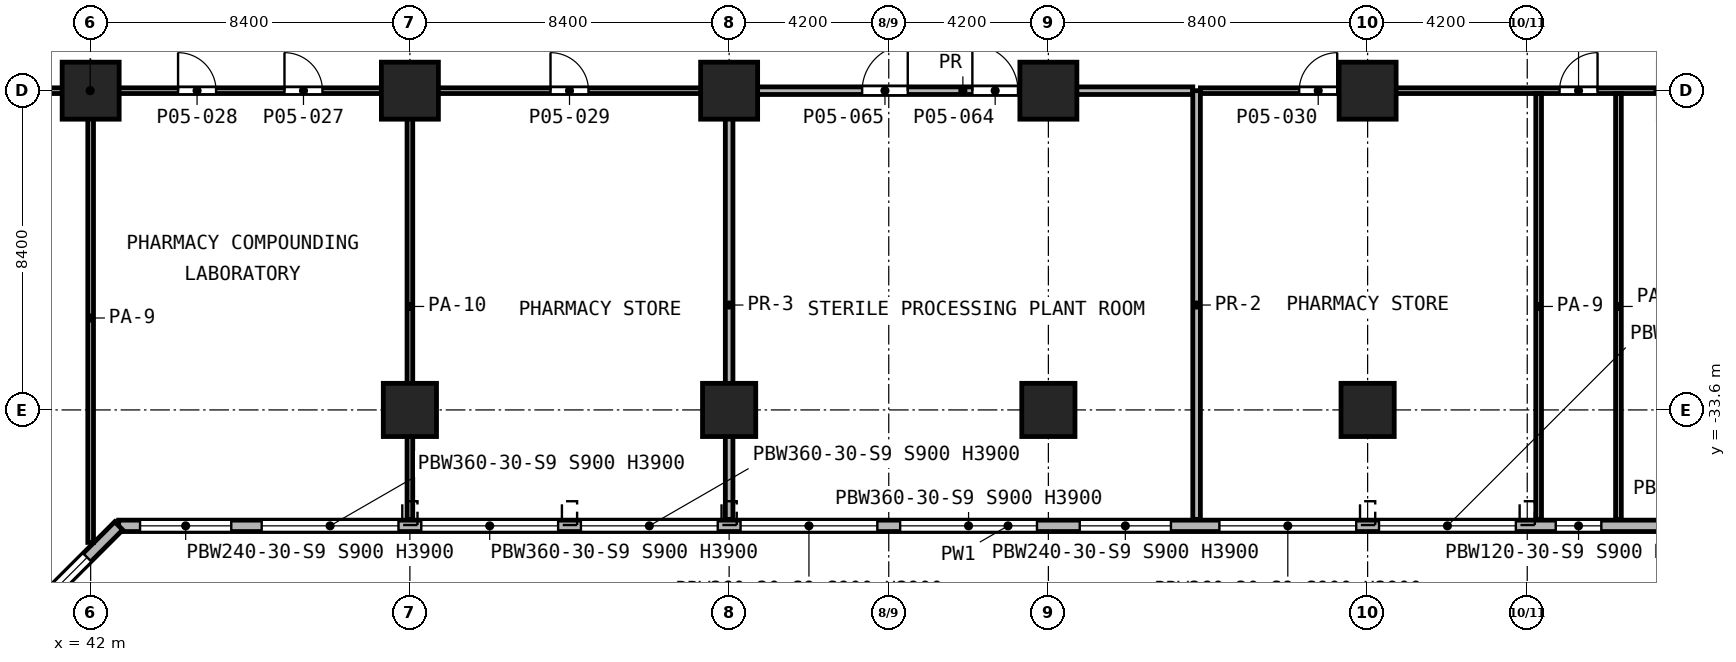
"""IFC4 building model, lengths in metres.
Left out: names, types, materials, properties, quantities, classifications, styles, units other than length and angle.
Written with IfcOpenShell. Run it as: python <this file> out.ifc"""

import sys

from ifc_helpers import new_model, si_unit, direction, frame, frame_2d, origin, origin_2d, place, context, subcontext, project, spatial, rectangle, extrude, element, fill, save


model = new_model("IFC4")
c1 = context("Model", 3, precision=1e-05, world=origin(), true_north=direction((0.0, 1.0)))
c2 = subcontext(c1, "Body", "Model", "MODEL_VIEW")
j1 = project(units=[si_unit("LENGTHUNIT", "METRE"), si_unit("PLANEANGLEUNIT", "RADIAN")], contexts=[c1])
p1 = place(None, origin())
s1 = spatial("IfcSite", under=j1, at=p1, CompositionType="ELEMENT")
p2 = place(p1, origin())
s2 = spatial("IfcBuilding", under=s1, at=p2, CompositionType="ELEMENT")
p3 = place(p2, frame((0.0, 0.0, 23.8)))
s3 = spatial("IfcBuildingStorey", under=s2, at=p3, CompositionType="ELEMENT", Elevation=23.8)
for number, where, z_axis, x_axis in (
    (1, (42.0, -25.2, 0.0), (0.0, 0.0, 1.0), (1.0, 0.0, 0.0)),
    (2, (50.4, -25.2, 0.0), (0.0, 0.0, 1.0), (1.0, 0.0, 0.0)),
    (3, (58.8, -25.2, 0.0), (0.0, 0.0, 1.0), (1.0, 0.0, 0.0)),
    (4, (67.2, -25.2, 0.0), (0.0, 0.0, 1.0), (1.0, 0.0, 0.0)),
    (5, (75.6, -25.2, 0.0), (0.0, 0.0, 1.0), (1.0, 0.0, 0.0)),
):
    element("IfcColumn", number, at=place(p3, frame(where, z_axis=z_axis, x_axis=x_axis)), inside=s3, PredefinedType="COLUMN", context=c2, shape_type="SweptSolid", body=[
        extrude(rectangle(XDim=1.5, YDim=1.5, at=origin_2d()), origin(), (0.0, 0.0, 1.0), 5.2),
    ])
for number, where, z_axis, x_axis in (
    (6, (50.4, -33.6, 0.0), (0.0, 0.0, 1.0), (1.0, 0.0, 0.0)),
    (7, (58.8, -33.6, 0.0), (0.0, 0.0, 1.0), (1.0, 0.0, 0.0)),
    (8, (67.2, -33.6, 0.0), (0.0, 0.0, 1.0), (1.0, 0.0, 0.0)),
    (9, (75.6, -33.6, 0.0), (0.0, 0.0, 1.0), (1.0, 0.0, 0.0)),
):
    element("IfcColumn", number, at=place(p3, frame(where, z_axis=z_axis, x_axis=x_axis)), inside=s3, PredefinedType="COLUMN", context=c2, shape_type="SweptSolid", body=[
        extrude(rectangle(XDim=1.4, YDim=1.4, at=origin_2d()), origin(), (0.0, 0.0, 1.0), 5.2),
    ])
p4 = place(p3, frame((36.65, -42.738, 0.0), z_axis=(0.0, 0.0, 1.0), x_axis=(0.707106781187, 0.707106781187, 0.0)))
e10 = element("IfcWall", 10, at=p4, inside=s3, PredefinedType="SOLIDWALL", context=c2, shape_type="SweptSolid", body=[
    extrude(rectangle(XDim=8.61, YDim=0.3, at=frame_2d((4.305, 0.0))), origin(), (0.0, 0.0, 1.0), 4.85),
])
p5 = place(p4, frame((1.09, 0.0, 0.9)))
e11 = element("IfcOpeningElement", 11, at=p5, cuts=e10, PredefinedType="OPENING", context=c2, shape_type="SweptSolid", body=[
    extrude(rectangle(XDim=2.4, YDim=3.0, at=frame_2d((1.2, 1.5))), frame((0.0, 0.16, 0.0), z_axis=(0.0, -1.0, 0.0), x_axis=(1.0, 0.0, 0.0)), (0.0, 0.0, 1.0), 0.32),
])
p6 = place(p4, frame((5.035, 0.0, 0.9)))
e12 = element("IfcOpeningElement", 12, at=p6, cuts=e10, PredefinedType="OPENING", context=c2, shape_type="SweptSolid", body=[
    extrude(rectangle(XDim=2.4, YDim=3.0, at=frame_2d((1.2, 1.5))), frame((0.0, 0.16, 0.0), z_axis=(0.0, -1.0, 0.0), x_axis=(1.0, 0.0, 0.0)), (0.0, 0.0, 1.0), 0.32),
])
p7 = place(p3, frame((42.738, -36.65, 0.0), z_axis=(0.0, 0.0, 1.0), x_axis=(1.0, 0.0, 0.0)))
e13 = element("IfcWall", 13, at=p7, inside=s3, PredefinedType="SOLIDWALL", context=c2, shape_type="SweptSolid", body=[
    extrude(rectangle(XDim=46.8, YDim=0.3, at=frame_2d((23.4, 0.0))), origin(), (0.0, 0.0, 1.0), 4.85),
])
p8 = place(p7, frame((0.562, 0.0, 0.9)))
e14 = element("IfcOpeningElement", 14, at=p8, cuts=e13, PredefinedType="OPENING", context=c2, shape_type="SweptSolid", body=[
    extrude(rectangle(XDim=2.4, YDim=3.0, at=frame_2d((1.2, 1.5))), frame((0.0, 0.16, 0.0), z_axis=(0.0, -1.0, 0.0), x_axis=(1.0, 0.0, 0.0)), (0.0, 0.0, 1.0), 0.32),
])
p9 = place(p7, frame((3.762, 0.0, 0.9)))
e15 = element("IfcOpeningElement", 15, at=p9, cuts=e13, PredefinedType="OPENING", context=c2, shape_type="SweptSolid", body=[
    extrude(rectangle(XDim=3.6, YDim=3.0, at=frame_2d((1.8, 1.5))), frame((0.0, 0.16, 0.0), z_axis=(0.0, -1.0, 0.0), x_axis=(1.0, 0.0, 0.0)), (0.0, 0.0, 1.0), 0.32),
])
p10 = place(p7, frame((7.962, 0.0, 0.9)))
e16 = element("IfcOpeningElement", 16, at=p10, cuts=e13, PredefinedType="OPENING", context=c2, shape_type="SweptSolid", body=[
    extrude(rectangle(XDim=3.6, YDim=3.0, at=frame_2d((1.8, 1.5))), frame((0.0, 0.16, 0.0), z_axis=(0.0, -1.0, 0.0), x_axis=(1.0, 0.0, 0.0)), (0.0, 0.0, 1.0), 0.32),
])
p11 = place(p7, frame((12.162, 0.0, 0.9)))
e17 = element("IfcOpeningElement", 17, at=p11, cuts=e13, PredefinedType="OPENING", context=c2, shape_type="SweptSolid", body=[
    extrude(rectangle(XDim=3.6, YDim=3.0, at=frame_2d((1.8, 1.5))), frame((0.0, 0.16, 0.0), z_axis=(0.0, -1.0, 0.0), x_axis=(1.0, 0.0, 0.0)), (0.0, 0.0, 1.0), 0.32),
])
p12 = place(p7, frame((16.362, 0.0, 0.9)))
e18 = element("IfcOpeningElement", 18, at=p12, cuts=e13, PredefinedType="OPENING", context=c2, shape_type="SweptSolid", body=[
    extrude(rectangle(XDim=3.6, YDim=3.0, at=frame_2d((1.8, 1.5))), frame((0.0, 0.16, 0.0), z_axis=(0.0, -1.0, 0.0), x_axis=(1.0, 0.0, 0.0)), (0.0, 0.0, 1.0), 0.32),
])
p13 = place(p7, frame((20.562, 0.0, 0.9)))
e19 = element("IfcOpeningElement", 19, at=p13, cuts=e13, PredefinedType="OPENING", context=c2, shape_type="SweptSolid", body=[
    extrude(rectangle(XDim=3.6, YDim=3.0, at=frame_2d((1.8, 1.5))), frame((0.0, 0.16, 0.0), z_axis=(0.0, -1.0, 0.0), x_axis=(1.0, 0.0, 0.0)), (0.0, 0.0, 1.0), 0.32),
])
p14 = place(p7, frame((25.287, 0.0, 0.9)))
e20 = element("IfcOpeningElement", 20, at=p14, cuts=e13, PredefinedType="OPENING", context=c2, shape_type="SweptSolid", body=[
    extrude(rectangle(XDim=2.4, YDim=3.0, at=frame_2d((1.2, 1.5))), frame((0.0, 0.16, 0.0), z_axis=(0.0, -1.0, 0.0), x_axis=(1.0, 0.0, 0.0)), (0.0, 0.0, 1.0), 0.32),
])
p15 = place(p7, frame((28.962, 0.0, 0.9)))
e21 = element("IfcOpeningElement", 21, at=p15, cuts=e13, PredefinedType="OPENING", context=c2, shape_type="SweptSolid", body=[
    extrude(rectangle(XDim=3.6, YDim=3.0, at=frame_2d((1.8, 1.5))), frame((0.0, 0.16, 0.0), z_axis=(0.0, -1.0, 0.0), x_axis=(1.0, 0.0, 0.0)), (0.0, 0.0, 1.0), 0.32),
])
p16 = place(p7, frame((33.162, 0.0, 0.9)))
e22 = element("IfcOpeningElement", 22, at=p16, cuts=e13, PredefinedType="OPENING", context=c2, shape_type="SweptSolid", body=[
    extrude(rectangle(XDim=3.6, YDim=3.0, at=frame_2d((1.8, 1.5))), frame((0.0, 0.16, 0.0), z_axis=(0.0, -1.0, 0.0), x_axis=(1.0, 0.0, 0.0)), (0.0, 0.0, 1.0), 0.32),
])
p17 = place(p7, frame((37.812, 0.0, 0.9)))
e23 = element("IfcOpeningElement", 23, at=p17, cuts=e13, PredefinedType="OPENING", context=c2, shape_type="SweptSolid", body=[
    extrude(rectangle(XDim=1.2, YDim=3.0, at=frame_2d((0.6, 1.5))), frame((0.0, 0.16, 0.0), z_axis=(0.0, -1.0, 0.0), x_axis=(1.0, 0.0, 0.0)), (0.0, 0.0, 1.0), 0.32),
])
p18 = place(p7, frame((41.562, 0.0, 0.9)))
e24 = element("IfcOpeningElement", 24, at=p18, cuts=e13, PredefinedType="OPENING", context=c2, shape_type="SweptSolid", body=[
    extrude(rectangle(XDim=3.6, YDim=3.0, at=frame_2d((1.8, 1.5))), frame((0.0, 0.16, 0.0), z_axis=(0.0, -1.0, 0.0), x_axis=(1.0, 0.0, 0.0)), (0.0, 0.0, 1.0), 0.32),
])
p19 = place(p3, frame((25.275, -25.2, 0.0), z_axis=(0.0, 0.0, 1.0), x_axis=(1.0, 0.0, 0.0)))
e25 = element("IfcWall", 25, at=p19, inside=s3, PredefinedType="PARTITIONING", context=c2, shape_type="SweptSolid", body=[
    extrude(rectangle(XDim=33.425, YDim=0.15, at=frame_2d((16.712, 0.0))), origin(), (0.0, 0.0, 1.0), 4.85),
])
p20 = place(p19, frame((13.425, 0.0, 0.0)))
e26 = element("IfcOpeningElement", 26, at=p20, cuts=e25, PredefinedType="OPENING", context=c2, shape_type="SweptSolid", body=[
    extrude(rectangle(XDim=1.0, YDim=2.1, at=frame_2d((0.5, 1.05))), frame((0.0, 0.085, 0.0), z_axis=(0.0, -1.0, 0.0), x_axis=(1.0, 0.0, 0.0)), (0.0, 0.0, 1.0), 0.17),
])
p21 = place(p19, frame((10.625, 0.0, 0.0)))
e27 = element("IfcOpeningElement", 27, at=p21, cuts=e25, PredefinedType="OPENING", context=c2, shape_type="SweptSolid", body=[
    extrude(rectangle(XDim=1.0, YDim=2.1, at=frame_2d((0.5, 1.05))), frame((0.0, 0.085, 0.0), z_axis=(0.0, -1.0, 0.0), x_axis=(1.0, 0.0, 0.0)), (0.0, 0.0, 1.0), 0.17),
])
p22 = place(p19, frame((21.825, 0.0, 0.0)))
e28 = element("IfcOpeningElement", 28, at=p22, cuts=e25, PredefinedType="OPENING", context=c2, shape_type="SweptSolid", body=[
    extrude(rectangle(XDim=1.0, YDim=2.1, at=frame_2d((0.5, 1.05))), frame((0.0, 0.085, 0.0), z_axis=(0.0, -1.0, 0.0), x_axis=(1.0, 0.0, 0.0)), (0.0, 0.0, 1.0), 0.17),
])
p23 = place(p19, frame((19.025, 0.0, 0.0)))
e29 = element("IfcOpeningElement", 29, at=p23, cuts=e25, PredefinedType="OPENING", context=c2, shape_type="SweptSolid", body=[
    extrude(rectangle(XDim=1.0, YDim=2.1, at=frame_2d((0.5, 1.05))), frame((0.0, 0.085, 0.0), z_axis=(0.0, -1.0, 0.0), x_axis=(1.0, 0.0, 0.0)), (0.0, 0.0, 1.0), 0.17),
])
p24 = place(p19, frame((28.825, 0.0, 0.0)))
e30 = element("IfcOpeningElement", 30, at=p24, cuts=e25, PredefinedType="OPENING", context=c2, shape_type="SweptSolid", body=[
    extrude(rectangle(XDim=1.0, YDim=2.1, at=frame_2d((0.5, 1.05))), frame((0.0, 0.085, 0.0), z_axis=(0.0, -1.0, 0.0), x_axis=(1.0, 0.0, 0.0)), (0.0, 0.0, 1.0), 0.17),
])
p25 = place(p3, frame((71.2, -25.2, 0.0), z_axis=(0.0, 0.0, 1.0), x_axis=(1.0, 0.0, 0.0)))
e31 = element("IfcWall", 31, at=p25, inside=s3, PredefinedType="PARTITIONING", context=c2, shape_type="SweptSolid", body=[
    extrude(rectangle(XDim=24.08, YDim=0.15, at=frame_2d((12.04, 0.0))), origin(), (0.0, 0.0, 1.0), 3.45),
])
p26 = place(p25, frame((2.6, 0.0, 0.0)))
e32 = element("IfcOpeningElement", 32, at=p26, cuts=e31, PredefinedType="OPENING", context=c2, shape_type="SweptSolid", body=[
    extrude(rectangle(XDim=1.0, YDim=2.1, at=frame_2d((0.5, 1.05))), frame((0.0, 0.085, 0.0), z_axis=(0.0, -1.0, 0.0), x_axis=(1.0, 0.0, 0.0)), (0.0, 0.0, 1.0), 0.17),
])
p27 = place(p25, frame((17.2, 0.0, 0.0)))
e33 = element("IfcOpeningElement", 33, at=p27, cuts=e31, PredefinedType="OPENING", context=c2, shape_type="SweptSolid", body=[
    extrude(rectangle(XDim=1.0, YDim=2.1, at=frame_2d((0.5, 1.05))), frame((0.0, 0.085, 0.0), z_axis=(0.0, -1.0, 0.0), x_axis=(1.0, 0.0, 0.0)), (0.0, 0.0, 1.0), 0.17),
])
p28 = place(p25, frame((9.45, 0.0, 0.0)))
e34 = element("IfcOpeningElement", 34, at=p28, cuts=e31, PredefinedType="OPENING", context=c2, shape_type="SweptSolid", body=[
    extrude(rectangle(XDim=1.0, YDim=2.1, at=frame_2d((0.5, 1.05))), frame((0.0, 0.085, 0.0), z_axis=(0.0, -1.0, 0.0), x_axis=(1.0, 0.0, 0.0)), (0.0, 0.0, 1.0), 0.17),
])
p29 = place(p3, frame((42.0, -37.087, 0.0), z_axis=(0.0, 0.0, 1.0), x_axis=(0.0, 1.0, 0.0)))
e35 = element("IfcWall", 35, at=p29, inside=s3, PredefinedType="PARTITIONING", context=c2, shape_type="SweptSolid", body=[
    extrude(rectangle(XDim=11.812, YDim=0.15, at=frame_2d((5.906, 0.0))), origin(), (0.0, 0.0, 1.0), 3.45),
])
p30 = place(p3, frame((50.4, -36.48, 0.0), z_axis=(0.0, 0.0, 1.0), x_axis=(0.0, 1.0, 0.0)))
e36 = element("IfcWall", 36, at=p30, inside=s3, PredefinedType="PARTITIONING", context=c2, shape_type="SweptSolid", body=[
    extrude(rectangle(XDim=11.205, YDim=0.15, at=frame_2d((5.603, 0.0))), origin(), (0.0, 0.0, 1.0), 3.95),
])
for number, where, z_axis, x_axis in (
    (37, (80.1, -36.48, 0.0), (0.0, 0.0, 1.0), (0.0, 1.0, 0.0)),
    (38, (82.2, -36.48, 0.0), (0.0, 0.0, 1.0), (0.0, 1.0, 0.0)),
):
    element("IfcWall", number, at=place(p3, frame(where, z_axis=z_axis, x_axis=x_axis)), inside=s3, PredefinedType="PARTITIONING", context=c2, shape_type="SweptSolid", body=[
        extrude(rectangle(XDim=11.205, YDim=0.15, at=frame_2d((5.603, 0.0))), origin(), (0.0, 0.0, 1.0), 3.45),
    ])
p31 = place(p3, frame((58.9, -25.2, 0.0), z_axis=(0.0, 0.0, 1.0), x_axis=(1.0, 0.0, 0.0)))
e39 = element("IfcWall", 39, at=p31, inside=s3, PredefinedType="PARTITIONING", context=c2, shape_type="SweptSolid", body=[
    extrude(rectangle(XDim=12.1, YDim=0.2, at=frame_2d((6.05, 0.0))), origin(), (0.0, 0.0, 1.0), 4.85),
])
p32 = place(p31, frame((6.3, 0.0, 0.0)))
e40 = element("IfcOpeningElement", 40, at=p32, cuts=e39, PredefinedType="OPENING", context=c2, shape_type="SweptSolid", body=[
    extrude(rectangle(XDim=1.2, YDim=2.1, at=frame_2d((0.6, 1.05))), frame((0.0, 0.11, 0.0), z_axis=(0.0, -1.0, 0.0), x_axis=(1.0, 0.0, 0.0)), (0.0, 0.0, 1.0), 0.22),
])
p33 = place(p31, frame((3.4, 0.0, 0.0)))
e41 = element("IfcOpeningElement", 41, at=p33, cuts=e39, PredefinedType="OPENING", context=c2, shape_type="SweptSolid", body=[
    extrude(rectangle(XDim=1.2, YDim=2.1, at=frame_2d((0.6, 1.05))), frame((0.0, 0.11, 0.0), z_axis=(0.0, -1.0, 0.0), x_axis=(1.0, 0.0, 0.0)), (0.0, 0.0, 1.0), 0.22),
])
p34 = place(p3, frame((58.8, -36.48, 0.0), z_axis=(0.0, 0.0, 1.0), x_axis=(0.0, 1.0, 0.0)))
e42 = element("IfcWall", 42, at=p34, inside=s3, PredefinedType="PARTITIONING", context=c2, shape_type="SweptSolid", body=[
    extrude(rectangle(XDim=11.28, YDim=0.2, at=frame_2d((5.64, 0.0))), origin(), (0.0, 0.0, 1.0), 3.95),
])
p35 = place(p3, frame((71.1, -36.48, 0.0), z_axis=(0.0, 0.0, 1.0), x_axis=(0.0, 1.0, 0.0)))
e43 = element("IfcWall", 43, at=p35, inside=s3, PredefinedType="PARTITIONING", context=c2, shape_type="SweptSolid", body=[
    extrude(rectangle(XDim=11.28, YDim=0.2, at=frame_2d((5.64, 0.0))), origin(), (0.0, 0.0, 1.0), 3.45),
])
p36 = place(p6, origin())
e44 = element("IfcWindow", 44, at=p36, inside=s3, PartitioningType="SINGLE_PANEL", PredefinedType="WINDOW", context=c2, shape_type="SweptSolid", body=[
    extrude(rectangle(XDim=2.4, YDim=3.0, at=frame_2d((1.2, 1.5))), frame((0.0, 0.03, 0.0), z_axis=(0.0, -1.0, 0.0), x_axis=(1.0, 0.0, 0.0)), (0.0, 0.0, 1.0), 0.06),
])
fill(e12, e44)
p37 = place(p8, origin())
e45 = element("IfcWindow", 45, at=p37, inside=s3, PartitioningType="SINGLE_PANEL", PredefinedType="WINDOW", context=c2, shape_type="SweptSolid", body=[
    extrude(rectangle(XDim=2.4, YDim=3.0, at=frame_2d((1.2, 1.5))), frame((0.0, 0.03, 0.0), z_axis=(0.0, -1.0, 0.0), x_axis=(1.0, 0.0, 0.0)), (0.0, 0.0, 1.0), 0.06),
])
fill(e14, e45)
p38 = place(p9, origin())
e46 = element("IfcWindow", 46, at=p38, inside=s3, PartitioningType="SINGLE_PANEL", PredefinedType="WINDOW", context=c2, shape_type="SweptSolid", body=[
    extrude(rectangle(XDim=3.6, YDim=3.0, at=frame_2d((1.8, 1.5))), frame((0.0, 0.03, 0.0), z_axis=(0.0, -1.0, 0.0), x_axis=(1.0, 0.0, 0.0)), (0.0, 0.0, 1.0), 0.06),
])
fill(e15, e46)
p39 = place(p10, origin())
e47 = element("IfcWindow", 47, at=p39, inside=s3, PartitioningType="SINGLE_PANEL", PredefinedType="WINDOW", context=c2, shape_type="SweptSolid", body=[
    extrude(rectangle(XDim=3.6, YDim=3.0, at=frame_2d((1.8, 1.5))), frame((0.0, 0.03, 0.0), z_axis=(0.0, -1.0, 0.0), x_axis=(1.0, 0.0, 0.0)), (0.0, 0.0, 1.0), 0.06),
])
fill(e16, e47)
p40 = place(p11, origin())
e48 = element("IfcWindow", 48, at=p40, inside=s3, PartitioningType="SINGLE_PANEL", PredefinedType="WINDOW", context=c2, shape_type="SweptSolid", body=[
    extrude(rectangle(XDim=3.6, YDim=3.0, at=frame_2d((1.8, 1.5))), frame((0.0, 0.03, 0.0), z_axis=(0.0, -1.0, 0.0), x_axis=(1.0, 0.0, 0.0)), (0.0, 0.0, 1.0), 0.06),
])
fill(e17, e48)
p41 = place(p12, origin())
e49 = element("IfcWindow", 49, at=p41, inside=s3, PartitioningType="SINGLE_PANEL", PredefinedType="WINDOW", context=c2, shape_type="SweptSolid", body=[
    extrude(rectangle(XDim=3.6, YDim=3.0, at=frame_2d((1.8, 1.5))), frame((0.0, 0.03, 0.0), z_axis=(0.0, -1.0, 0.0), x_axis=(1.0, 0.0, 0.0)), (0.0, 0.0, 1.0), 0.06),
])
fill(e18, e49)
p42 = place(p13, origin())
e50 = element("IfcWindow", 50, at=p42, inside=s3, PartitioningType="SINGLE_PANEL", PredefinedType="WINDOW", context=c2, shape_type="SweptSolid", body=[
    extrude(rectangle(XDim=3.6, YDim=3.0, at=frame_2d((1.8, 1.5))), frame((0.0, 0.03, 0.0), z_axis=(0.0, -1.0, 0.0), x_axis=(1.0, 0.0, 0.0)), (0.0, 0.0, 1.0), 0.06),
])
fill(e19, e50)
p43 = place(p14, origin())
e51 = element("IfcWindow", 51, at=p43, inside=s3, PartitioningType="SINGLE_PANEL", PredefinedType="WINDOW", context=c2, shape_type="SweptSolid", body=[
    extrude(rectangle(XDim=2.4, YDim=3.0, at=frame_2d((1.2, 1.5))), frame((0.0, 0.03, 0.0), z_axis=(0.0, -1.0, 0.0), x_axis=(1.0, 0.0, 0.0)), (0.0, 0.0, 1.0), 0.06),
])
fill(e20, e51)
p44 = place(p15, origin())
e52 = element("IfcWindow", 52, at=p44, inside=s3, PartitioningType="SINGLE_PANEL", PredefinedType="WINDOW", context=c2, shape_type="SweptSolid", body=[
    extrude(rectangle(XDim=3.6, YDim=3.0, at=frame_2d((1.8, 1.5))), frame((0.0, 0.03, 0.0), z_axis=(0.0, -1.0, 0.0), x_axis=(1.0, 0.0, 0.0)), (0.0, 0.0, 1.0), 0.06),
])
fill(e21, e52)
p45 = place(p16, origin())
e53 = element("IfcWindow", 53, at=p45, inside=s3, PartitioningType="SINGLE_PANEL", PredefinedType="WINDOW", context=c2, shape_type="SweptSolid", body=[
    extrude(rectangle(XDim=3.6, YDim=3.0, at=frame_2d((1.8, 1.5))), frame((0.0, 0.03, 0.0), z_axis=(0.0, -1.0, 0.0), x_axis=(1.0, 0.0, 0.0)), (0.0, 0.0, 1.0), 0.06),
])
fill(e22, e53)
p46 = place(p17, origin())
e54 = element("IfcWindow", 54, at=p46, inside=s3, PartitioningType="SINGLE_PANEL", PredefinedType="WINDOW", context=c2, shape_type="SweptSolid", body=[
    extrude(rectangle(XDim=1.2, YDim=3.0, at=frame_2d((0.6, 1.5))), frame((0.0, 0.03, 0.0), z_axis=(0.0, -1.0, 0.0), x_axis=(1.0, 0.0, 0.0)), (0.0, 0.0, 1.0), 0.06),
])
fill(e23, e54)
p47 = place(p22, origin())
e55 = element("IfcDoor", 55, at=p47, inside=s3, OperationType="SINGLE_SWING_LEFT", PredefinedType="DOOR", context=c2, shape_type="SweptSolid", body=[
    extrude(rectangle(XDim=1.0, YDim=2.1, at=frame_2d((0.5, 1.05))), frame((0.0, 0.025, 0.0), z_axis=(0.0, -1.0, 0.0), x_axis=(1.0, 0.0, 0.0)), (0.0, 0.0, 1.0), 0.05),
])
fill(e28, e55)
p48 = place(p23, origin())
e56 = element("IfcDoor", 56, at=p48, inside=s3, OperationType="SINGLE_SWING_LEFT", PredefinedType="DOOR", context=c2, shape_type="SweptSolid", body=[
    extrude(rectangle(XDim=1.0, YDim=2.1, at=frame_2d((0.5, 1.05))), frame((0.0, 0.025, 0.0), z_axis=(0.0, -1.0, 0.0), x_axis=(1.0, 0.0, 0.0)), (0.0, 0.0, 1.0), 0.05),
])
fill(e29, e56)
p49 = place(p24, origin())
e57 = element("IfcDoor", 57, at=p49, inside=s3, OperationType="SINGLE_SWING_LEFT", PredefinedType="DOOR", context=c2, shape_type="SweptSolid", body=[
    extrude(rectangle(XDim=1.0, YDim=2.1, at=frame_2d((0.5, 1.05))), frame((0.0, 0.025, 0.0), z_axis=(0.0, -1.0, 0.0), x_axis=(1.0, 0.0, 0.0)), (0.0, 0.0, 1.0), 0.05),
])
fill(e30, e57)
p50 = place(p32, origin())
e58 = element("IfcDoor", 58, at=p50, inside=s3, OperationType="SINGLE_SWING_LEFT", PredefinedType="DOOR", context=c2, shape_type="SweptSolid", body=[
    extrude(rectangle(XDim=1.2, YDim=2.1, at=frame_2d((0.6, 1.05))), frame((0.0, 0.025, 0.0), z_axis=(0.0, -1.0, 0.0), x_axis=(1.0, 0.0, 0.0)), (0.0, 0.0, 1.0), 0.05),
])
fill(e40, e58)
p51 = place(p33, origin())
e59 = element("IfcDoor", 59, at=p51, inside=s3, OperationType="SINGLE_SWING_RIGHT", PredefinedType="DOOR", context=c2, shape_type="SweptSolid", body=[
    extrude(rectangle(XDim=1.2, YDim=2.1, at=frame_2d((0.6, 1.05))), frame((0.0, 0.025, 0.0), z_axis=(0.0, -1.0, 0.0), x_axis=(1.0, 0.0, 0.0)), (0.0, 0.0, 1.0), 0.05),
])
fill(e41, e59)
p52 = place(p26, origin())
e60 = element("IfcDoor", 60, at=p52, inside=s3, OperationType="SINGLE_SWING_RIGHT", PredefinedType="DOOR", context=c2, shape_type="SweptSolid", body=[
    extrude(rectangle(XDim=1.0, YDim=2.1, at=frame_2d((0.5, 1.05))), frame((0.0, 0.025, 0.0), z_axis=(0.0, -1.0, 0.0), x_axis=(1.0, 0.0, 0.0)), (0.0, 0.0, 1.0), 0.05),
])
fill(e32, e60)
p53 = place(p28, origin())
e61 = element("IfcDoor", 61, at=p53, inside=s3, OperationType="SINGLE_SWING_RIGHT", PredefinedType="DOOR", context=c2, shape_type="SweptSolid", body=[
    extrude(rectangle(XDim=1.0, YDim=2.1, at=frame_2d((0.5, 1.05))), frame((0.0, 0.025, 0.0), z_axis=(0.0, -1.0, 0.0), x_axis=(1.0, 0.0, 0.0)), (0.0, 0.0, 1.0), 0.05),
])
fill(e34, e61)
save(model, sys.argv[1])
